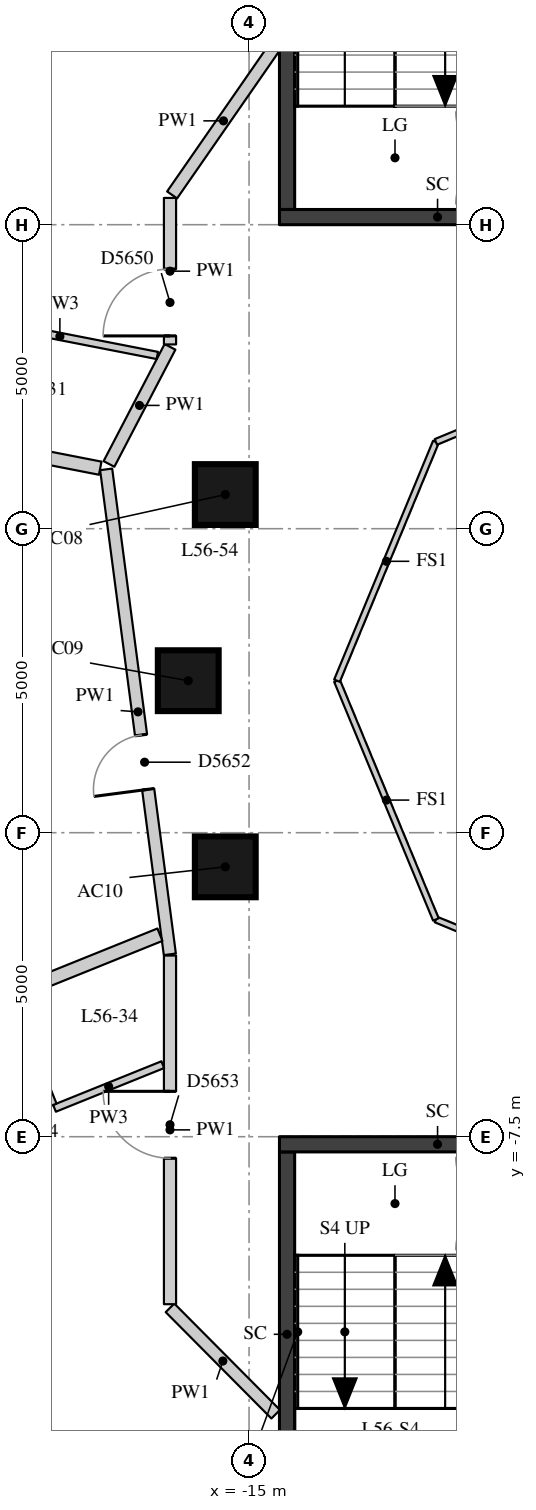
"""IFC4 building model, lengths in metres.
Left out: names, types, materials, properties, quantities, classifications, styles, units other than length and angle.
Written with IfcOpenShell. Run it as: python <this file> out.ifc"""

import sys

from ifc_helpers import new_model, si_unit, direction, frame, frame_2d, origin, origin_2d, place, context, subcontext, project, spatial, rectangle, extrude, element, fill, save


model = new_model("IFC4")
c1 = context("Model", 3, precision=1e-05, world=origin(), true_north=direction((0.0, 1.0)))
c2 = subcontext(c1, "Body", "Model", "MODEL_VIEW")
j1 = project(units=[si_unit("LENGTHUNIT", "METRE"), si_unit("PLANEANGLEUNIT", "RADIAN")], contexts=[c1])
p1 = place(None, origin())
s1 = spatial("IfcSite", under=j1, at=p1, CompositionType="ELEMENT")
p2 = place(p1, origin())
s2 = spatial("IfcBuilding", under=s1, at=p2, CompositionType="ELEMENT")
p3 = place(p2, frame((0.0, 0.0, 199.1)))
s3 = spatial("IfcBuildingStorey", under=s2, at=p3, CompositionType="ELEMENT", Elevation=199.1)
for number, where, z_axis, x_axis in (
    (1, (-15.391, 3.062, 0.0), (0.0, 0.0, 1.0), (1.0, 0.0, 0.0)),
    (2, (-16.0, 0.0, 0.0), (0.0, 0.0, 1.0), (1.0, 0.0, 0.0)),
    (3, (-15.391, -3.062, 0.0), (0.0, 0.0, 1.0), (1.0, 0.0, 0.0)),
):
    element("IfcColumn", number, at=place(p3, frame(where, z_axis=z_axis, x_axis=x_axis)), inside=s3, PredefinedType="COLUMN", context=c2, shape_type="SweptSolid", body=[
        extrude(rectangle(XDim=1.0, YDim=1.0, at=origin_2d()), origin(), (0.0, 0.0, 1.0), 3.3),
    ])
p4 = place(p3, frame((-14.375, 7.75, -0.28), z_axis=(0.0, 0.0, 1.0), x_axis=(0.0, 1.0, 0.0)))
e4 = element("IfcWall", 4, at=p4, inside=s3, PredefinedType="SHEAR", context=c2, shape_type="SweptSolid", body=[
    extrude(rectangle(XDim=6.0, YDim=0.25, at=frame_2d((3.0, 0.0))), origin(), (0.0, 0.0, 1.0), 3.3),
])
p5 = place(p3, frame((-14.5, 7.625, -0.28), z_axis=(0.0, 0.0, 1.0), x_axis=(1.0, 0.0, 0.0)))
e5 = element("IfcWall", 5, at=p5, inside=s3, PredefinedType="SHEAR", context=c2, shape_type="SweptSolid", body=[
    extrude(rectangle(XDim=5.2, YDim=0.25, at=frame_2d((2.6, 0.0))), origin(), (0.0, 0.0, 1.0), 3.3),
])
p6 = place(p3, frame((-14.375, -13.75, -0.28), z_axis=(0.0, 0.0, 1.0), x_axis=(0.0, 1.0, 0.0)))
e6 = element("IfcWall", 6, at=p6, inside=s3, PredefinedType="SHEAR", context=c2, shape_type="SweptSolid", body=[
    extrude(rectangle(XDim=6.0, YDim=0.25, at=frame_2d((3.0, 0.0))), origin(), (0.0, 0.0, 1.0), 3.3),
])
p7 = place(p3, frame((-14.5, -7.625, -0.28), z_axis=(0.0, 0.0, 1.0), x_axis=(1.0, 0.0, 0.0)))
e7 = element("IfcWall", 7, at=p7, inside=s3, PredefinedType="SHEAR", context=c2, shape_type="SweptSolid", body=[
    extrude(rectangle(XDim=5.2, YDim=0.25, at=frame_2d((2.6, 0.0))), origin(), (0.0, 0.0, 1.0), 3.3),
])
p8 = place(p3, frame((-14.562, -12.064, 0.0), z_axis=(0.0, 0.0, 1.0), x_axis=(-0.704826289083, 0.709379942074, 0.0)))
e8 = element("IfcWall", 8, at=p8, inside=s3, PredefinedType="PARTITIONING", context=c2, shape_type="SweptSolid", body=[
    extrude(rectangle(XDim=2.466, YDim=0.2, at=frame_2d((1.233, 0.0))), origin(), (0.0, 0.0, 1.0), 3.02),
])
p9 = place(p3, frame((-16.3, -10.255, 0.0), z_axis=(0.0, 0.0, 1.0), x_axis=(0.0, 1.0, 0.0)))
e9 = element("IfcWall", 9, at=p9, inside=s3, PredefinedType="PARTITIONING", context=c2, shape_type="SweptSolid", body=[
    extrude(rectangle(XDim=5.734, YDim=0.2, at=frame_2d((2.867, 0.0))), origin(), (0.0, 0.0, 1.0), 3.02),
])
p10 = place(p9, frame((2.401, 0.0, 0.0)))
e10 = element("IfcOpeningElement", 10, at=p10, cuts=e9, PredefinedType="OPENING", context=c2, shape_type="SweptSolid", body=[
    extrude(rectangle(XDim=1.1, YDim=2.1, at=frame_2d((0.55, 1.05))), frame((0.0, 0.11, 0.0), z_axis=(0.0, -1.0, 0.0), x_axis=(1.0, 0.0, 0.0)), (0.0, 0.0, 1.0), 0.22),
])
p11 = place(p3, frame((-16.303, -4.501, 0.0), z_axis=(0.0, 0.0, 1.0), x_axis=(-0.130191522351, 0.991488864036, 0.0)))
e11 = element("IfcWall", 11, at=p11, inside=s3, PredefinedType="PARTITIONING", context=c2, shape_type="SweptSolid", body=[
    extrude(rectangle(XDim=8.045, YDim=0.2, at=frame_2d((4.022, 0.0))), origin(), (0.0, 0.0, 1.0), 3.02),
])
p12 = place(p11, frame((2.738, 0.0, 0.0)))
e12 = element("IfcOpeningElement", 12, at=p12, cuts=e11, PredefinedType="OPENING", context=c2, shape_type="SweptSolid", body=[
    extrude(rectangle(XDim=0.9, YDim=2.1, at=frame_2d((0.45, 1.05))), frame((0.0, 0.11, 0.0), z_axis=(0.0, -1.0, 0.0), x_axis=(1.0, 0.0, 0.0)), (0.0, 0.0, 1.0), 0.22),
])
p13 = place(p3, frame((-17.304, 3.565, 0.0), z_axis=(0.0, 0.0, 1.0), x_axis=(0.46212415324, 0.886815238363, 0.0)))
e13 = element("IfcWall", 13, at=p13, inside=s3, PredefinedType="PARTITIONING", context=c2, shape_type="SweptSolid", body=[
    extrude(rectangle(XDim=2.172, YDim=0.2, at=frame_2d((1.086, 0.0))), origin(), (0.0, 0.0, 1.0), 3.02),
])
p14 = place(p3, frame((-16.3, 5.531, 0.0), z_axis=(0.0, 0.0, 1.0), x_axis=(0.0, 1.0, 0.0)))
e14 = element("IfcWall", 14, at=p14, inside=s3, PredefinedType="PARTITIONING", context=c2, shape_type="SweptSolid", body=[
    extrude(rectangle(XDim=2.409, YDim=0.2, at=frame_2d((1.205, 0.0))), origin(), (0.0, 0.0, 1.0), 3.02),
])
p15 = place(p14, frame((0.14, 0.0, 0.0)))
e15 = element("IfcOpeningElement", 15, at=p15, cuts=e14, PredefinedType="OPENING", context=c2, shape_type="SweptSolid", body=[
    extrude(rectangle(XDim=1.1, YDim=2.1, at=frame_2d((0.55, 1.05))), frame((0.0, 0.11, 0.0), z_axis=(0.0, -1.0, 0.0), x_axis=(1.0, 0.0, 0.0)), (0.0, 0.0, 1.0), 0.22),
])
p16 = place(p3, frame((-16.266, 7.989, 0.0), z_axis=(0.0, 0.0, 1.0), x_axis=(0.569860411146, 0.821741511552, 0.0)))
e16 = element("IfcWall", 16, at=p16, inside=s3, PredefinedType="PARTITIONING", context=c2, shape_type="SweptSolid", body=[
    extrude(rectangle(XDim=2.966, YDim=0.2, at=frame_2d((1.483, 0.0))), origin(), (0.0, 0.0, 1.0), 3.02),
])
p17 = place(p3, frame((-22.697, 4.521, 0.0), z_axis=(0.0, 0.0, 1.0), x_axis=(0.981448712972, -0.19172486486, 0.0)))
e17 = element("IfcWall", 17, at=p17, inside=s3, PredefinedType="PARTITIONING", context=c2, shape_type="SweptSolid", body=[
    extrude(rectangle(XDim=5.348, YDim=0.22, at=frame_2d((2.674, 0.0))), origin(), (0.0, 0.0, 1.0), 2.47),
])
p18 = place(p3, frame((-22.896, -6.771, 0.0), z_axis=(0.0, 0.0, 1.0), x_axis=(0.927377440276, 0.374127095073, 0.0)))
e18 = element("IfcWall", 18, at=p18, inside=s3, PredefinedType="PARTITIONING", context=c2, shape_type="SweptSolid", body=[
    extrude(rectangle(XDim=6.933, YDim=0.22, at=frame_2d((3.467, 0.0))), origin(), (0.0, 0.0, 1.0), 3.02),
])
p19 = place(p3, frame((-16.508, 5.349, 0.0), z_axis=(0.0, 0.0, 1.0), x_axis=(-0.981441910277, 0.191759684898, 0.0)))
e19 = element("IfcWall", 19, at=p19, inside=s3, PredefinedType="PARTITIONING", context=c2, shape_type="SweptSolid", body=[
    extrude(rectangle(XDim=3.267, YDim=0.12, at=frame_2d((1.633, 0.0))), origin(), (0.0, 0.0, 1.0), 3.02),
])
p20 = place(p3, frame((-16.419, -6.315, 0.0), z_axis=(0.0, 0.0, 1.0), x_axis=(-0.927358946461, -0.374172933841, 0.0)))
e20 = element("IfcWall", 20, at=p20, inside=s3, PredefinedType="PARTITIONING", context=c2, shape_type="SweptSolid", body=[
    extrude(rectangle(XDim=1.92, YDim=0.12, at=frame_2d((0.96, 0.0))), origin(), (0.0, 0.0, 1.0), 3.02),
])
p21 = place(p3, frame((-18.222, -6.978, 0.0), z_axis=(0.0, 0.0, 1.0), x_axis=(-0.374218187905, 0.927340685963, 0.0)))
e21 = element("IfcWall", 21, at=p21, inside=s3, PredefinedType="PARTITIONING", context=c2, shape_type="SweptSolid", body=[
    extrude(rectangle(XDim=1.83, YDim=0.12, at=frame_2d((0.915, 0.0))), origin(), (0.0, 0.0, 1.0), 3.02),
])
p22 = place(p21, frame((0.54, 0.0, 0.0)))
e22 = element("IfcOpeningElement", 22, at=p22, cuts=e21, PredefinedType="OPENING", context=c2, shape_type="SweptSolid", body=[
    extrude(rectangle(XDim=0.8, YDim=2.1, at=frame_2d((0.4, 1.05))), frame((0.0, 0.07, 0.0), z_axis=(0.0, -1.0, 0.0), x_axis=(1.0, 0.0, 0.0)), (0.0, 0.0, 1.0), 0.14),
])
for number, where, z_axis, x_axis in (
    (23, (-8.0, -5.554, 0.0), (0.0, 0.0, 1.0), (-0.924, 0.383, 0.0)),
    (24, (-11.927, -3.927, 0.0), (0.0, 0.0, 1.0), (-0.383, 0.924, 0.0)),
    (25, (-13.554, 0.0, 0.0), (0.0, 0.0, 1.0), (0.383, 0.924, 0.0)),
    (26, (-11.927, 3.927, 0.0), (0.0, 0.0, 1.0), (0.924, 0.383, 0.0)),
):
    element("IfcWall", number, at=place(p3, frame(where, z_axis=z_axis, x_axis=x_axis)), inside=s3, PredefinedType="PARTITIONING", context=c2, shape_type="SweptSolid", body=[
        extrude(rectangle(XDim=4.251, YDim=0.1, at=frame_2d((2.125, 0.0))), origin(), (0.0, 0.0, 1.0), 3.02),
    ])
p23 = place(p15, origin())
e27 = element("IfcDoor", 27, at=p23, inside=s3, OperationType="SINGLE_SWING_LEFT", PredefinedType="DOOR", context=c2, shape_type="SweptSolid", body=[
    extrude(rectangle(XDim=1.1, YDim=2.1, at=frame_2d((0.55, 1.05))), frame((0.0, 0.025, 0.0), z_axis=(0.0, -1.0, 0.0), x_axis=(1.0, 0.0, 0.0)), (0.0, 0.0, 1.0), 0.05),
])
fill(e15, e27)
p24 = place(p12, origin())
e28 = element("IfcDoor", 28, at=p24, inside=s3, OperationType="SINGLE_SWING_LEFT", PredefinedType="DOOR", context=c2, shape_type="SweptSolid", body=[
    extrude(rectangle(XDim=0.9, YDim=2.1, at=frame_2d((0.45, 1.05))), frame((0.0, 0.025, 0.0), z_axis=(0.0, -1.0, 0.0), x_axis=(1.0, 0.0, 0.0)), (0.0, 0.0, 1.0), 0.05),
])
fill(e12, e28)
p25 = place(p10, origin())
e29 = element("IfcDoor", 29, at=p25, inside=s3, OperationType="SINGLE_SWING_RIGHT", PredefinedType="DOOR", context=c2, shape_type="SweptSolid", body=[
    extrude(rectangle(XDim=1.1, YDim=2.1, at=frame_2d((0.55, 1.05))), frame((0.0, 0.025, 0.0), z_axis=(0.0, -1.0, 0.0), x_axis=(1.0, 0.0, 0.0)), (0.0, 0.0, 1.0), 0.05),
])
fill(e10, e29)
save(model, sys.argv[1])
